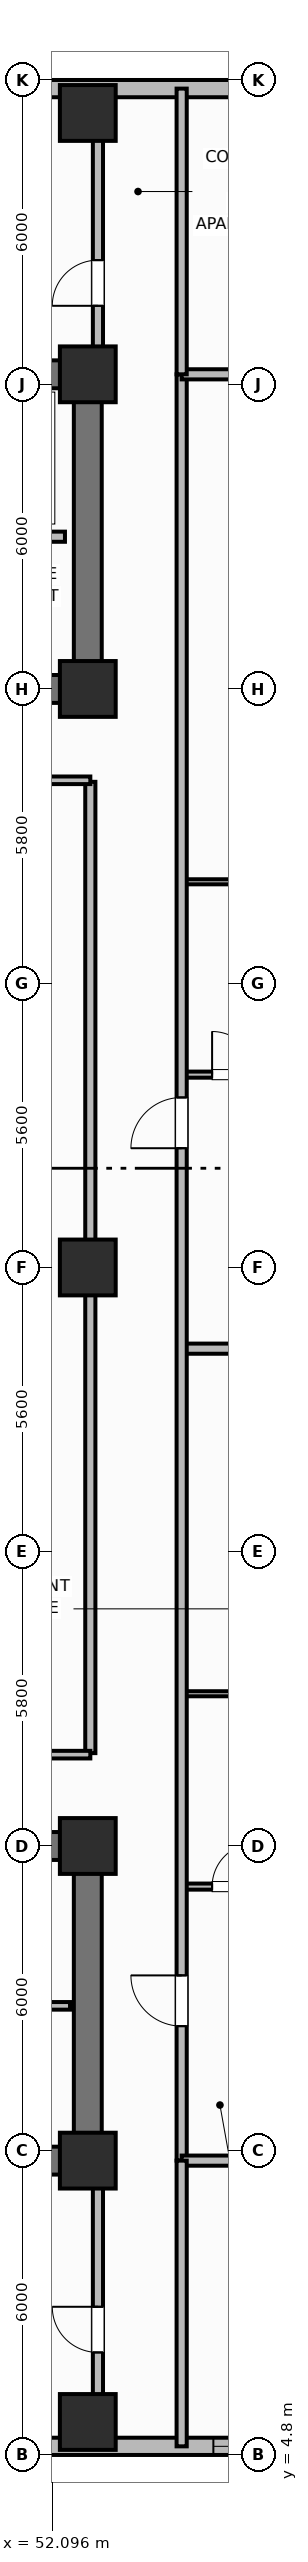
"""IFC4 building model, lengths in metres.
Left out: names, types, materials, properties, quantities, classifications, styles, units other than length and angle.
Written with IfcOpenShell. Run it as: python <this file> out.ifc"""

import sys

from ifc_helpers import new_model, si_unit, direction, frame, frame_2d, origin, origin_2d, place, context, subcontext, project, spatial, rectangle, extrude, element, fill, save


model = new_model("IFC4")
c1 = context("Model", 3, precision=1e-05, world=origin(), true_north=direction((0.0, 1.0)))
c2 = subcontext(c1, "Body", "Model", "MODEL_VIEW")
j1 = project(units=[si_unit("LENGTHUNIT", "METRE"), si_unit("PLANEANGLEUNIT", "RADIAN")], contexts=[c1])
p1 = place(None, origin())
s1 = spatial("IfcSite", under=j1, at=p1, CompositionType="ELEMENT")
p2 = place(p1, origin())
s2 = spatial("IfcBuilding", under=s1, at=p2, CompositionType="ELEMENT")
p3 = place(p2, frame((0.0, 0.0, 95.7)))
s3 = spatial("IfcBuildingStorey", under=s2, at=p3, CompositionType="ELEMENT", Elevation=95.7)
p4 = place(p3, frame((52.8, 10.6, 0.0), z_axis=(0.0, 0.0, 1.0), x_axis=(-1.0, 0.0, 0.0)))
e1 = element("IfcWall", 1, at=p4, inside=s3, PredefinedType="SHEAR", context=c2, shape_type="SweptSolid", body=[
    extrude(rectangle(XDim=27.2, YDim=0.55, at=frame_2d((13.6, 0.0))), origin(), (0.0, 0.0, 1.0), 3.7),
])
p5 = place(p3, frame((52.8, 10.875, 0.0), z_axis=(0.0, 0.0, 1.0), x_axis=(0.0, 1.0, 0.0)))
e2 = element("IfcWall", 2, at=p5, inside=s3, PredefinedType="SHEAR", context=c2, shape_type="SweptSolid", body=[
    extrude(rectangle(XDim=5.65, YDim=0.55, at=frame_2d((2.825, 0.0))), origin(), (0.0, 0.0, 1.0), 3.7),
])
p6 = place(p3, frame((25.6, 16.8, 0.0), z_axis=(0.0, 0.0, 1.0), x_axis=(1.0, 0.0, 0.0)))
e3 = element("IfcWall", 3, at=p6, inside=s3, PredefinedType="SHEAR", context=c2, shape_type="SweptSolid", body=[
    extrude(rectangle(XDim=27.2, YDim=0.55, at=frame_2d((13.6, 0.0))), origin(), (0.0, 0.0, 1.0), 3.7),
])
p7 = place(p6, frame((1.7, 0.0, 0.0)))
e4 = element("IfcOpeningElement", 4, at=p7, cuts=e3, PredefinedType="OPENING", context=c2, shape_type="SweptSolid", body=[
    extrude(rectangle(XDim=1.1, YDim=2.15, at=frame_2d((0.55, 1.075))), frame((0.0, 0.285, 0.0), z_axis=(0.0, -1.0, 0.0), x_axis=(1.0, 0.0, 0.0)), (0.0, 0.0, 1.0), 0.57),
])
p8 = place(p6, frame((4.45, 0.0, 0.0)))
e5 = element("IfcOpeningElement", 5, at=p8, cuts=e3, PredefinedType="OPENING", context=c2, shape_type="SweptSolid", body=[
    extrude(rectangle(XDim=0.85, YDim=2.1, at=frame_2d((0.425, 1.05))), frame((0.0, 0.285, 0.0), z_axis=(0.0, -1.0, 0.0), x_axis=(1.0, 0.0, 0.0)), (0.0, 0.0, 1.0), 0.57),
])
p9 = place(p6, frame((6.5, 0.0, 0.0)))
e6 = element("IfcOpeningElement", 6, at=p9, cuts=e3, PredefinedType="OPENING", context=c2, shape_type="SweptSolid", body=[
    extrude(rectangle(XDim=0.85, YDim=2.1, at=frame_2d((0.425, 1.05))), frame((0.0, 0.285, 0.0), z_axis=(0.0, -1.0, 0.0), x_axis=(1.0, 0.0, 0.0)), (0.0, 0.0, 1.0), 0.57),
])
p10 = place(p6, frame((13.0, 0.0, 0.0)))
e7 = element("IfcOpeningElement", 7, at=p10, cuts=e3, PredefinedType="OPENING", context=c2, shape_type="SweptSolid", body=[
    extrude(rectangle(XDim=1.2, YDim=2.15, at=frame_2d((0.6, 1.075))), frame((0.0, 0.285, 0.0), z_axis=(0.0, -1.0, 0.0), x_axis=(1.0, 0.0, 0.0)), (0.0, 0.0, 1.0), 0.57),
])
p11 = place(p6, frame((19.8, 0.0, 0.0)))
e8 = element("IfcOpeningElement", 8, at=p11, cuts=e3, PredefinedType="OPENING", context=c2, shape_type="SweptSolid", body=[
    extrude(rectangle(XDim=0.85, YDim=2.1, at=frame_2d((0.425, 1.05))), frame((0.0, 0.285, 0.0), z_axis=(0.0, -1.0, 0.0), x_axis=(1.0, 0.0, 0.0)), (0.0, 0.0, 1.0), 0.57),
])
p12 = place(p6, frame((24.2, 0.0, 0.0)))
e9 = element("IfcOpeningElement", 9, at=p12, cuts=e3, PredefinedType="OPENING", context=c2, shape_type="SweptSolid", body=[
    extrude(rectangle(XDim=0.85, YDim=2.1, at=frame_2d((0.425, 1.05))), frame((0.0, 0.285, 0.0), z_axis=(0.0, -1.0, 0.0), x_axis=(1.0, 0.0, 0.0)), (0.0, 0.0, 1.0), 0.57),
])
p13 = place(p3, frame((25.6, 45.8, 0.0), z_axis=(0.0, 0.0, 1.0), x_axis=(1.0, 0.0, 0.0)))
e10 = element("IfcWall", 10, at=p13, inside=s3, PredefinedType="SHEAR", context=c2, shape_type="SweptSolid", body=[
    extrude(rectangle(XDim=27.2, YDim=0.55, at=frame_2d((13.6, 0.0))), origin(), (0.0, 0.0, 1.0), 3.7),
])
p14 = place(p3, frame((52.8, 39.875, 0.0), z_axis=(0.0, 0.0, 1.0), x_axis=(0.0, 1.0, 0.0)))
e11 = element("IfcWall", 11, at=p14, inside=s3, PredefinedType="SHEAR", context=c2, shape_type="SweptSolid", body=[
    extrude(rectangle(XDim=5.65, YDim=0.55, at=frame_2d((2.825, 0.0))), origin(), (0.0, 0.0, 1.0), 3.7),
])
p15 = place(p3, frame((52.8, 39.6, 0.0), z_axis=(0.0, 0.0, 1.0), x_axis=(-1.0, 0.0, 0.0)))
e12 = element("IfcWall", 12, at=p15, inside=s3, PredefinedType="SHEAR", context=c2, shape_type="SweptSolid", body=[
    extrude(rectangle(XDim=27.2, YDim=0.55, at=frame_2d((13.6, 0.0))), origin(), (0.0, 0.0, 1.0), 3.7),
])
p16 = place(p15, frame((24.3, 0.0, 0.0)))
e13 = element("IfcOpeningElement", 13, at=p16, cuts=e12, PredefinedType="OPENING", context=c2, shape_type="SweptSolid", body=[
    extrude(rectangle(XDim=1.1, YDim=2.15, at=frame_2d((0.55, 1.075))), frame((0.0, 0.285, 0.0), z_axis=(0.0, -1.0, 0.0), x_axis=(1.0, 0.0, 0.0)), (0.0, 0.0, 1.0), 0.57),
])
p17 = place(p15, frame((21.85, 0.0, 0.0)))
e14 = element("IfcOpeningElement", 14, at=p17, cuts=e12, PredefinedType="OPENING", context=c2, shape_type="SweptSolid", body=[
    extrude(rectangle(XDim=0.85, YDim=2.1, at=frame_2d((0.425, 1.05))), frame((0.0, 0.285, 0.0), z_axis=(0.0, -1.0, 0.0), x_axis=(1.0, 0.0, 0.0)), (0.0, 0.0, 1.0), 0.57),
])
p18 = place(p15, frame((19.85, 0.0, 0.0)))
e15 = element("IfcOpeningElement", 15, at=p18, cuts=e12, PredefinedType="OPENING", context=c2, shape_type="SweptSolid", body=[
    extrude(rectangle(XDim=0.85, YDim=2.1, at=frame_2d((0.425, 1.05))), frame((0.0, 0.285, 0.0), z_axis=(0.0, -1.0, 0.0), x_axis=(1.0, 0.0, 0.0)), (0.0, 0.0, 1.0), 0.57),
])
p19 = place(p15, frame((15.1, 0.0, 0.0)))
e16 = element("IfcOpeningElement", 16, at=p19, cuts=e12, PredefinedType="OPENING", context=c2, shape_type="SweptSolid", body=[
    extrude(rectangle(XDim=1.2, YDim=2.15, at=frame_2d((0.6, 1.075))), frame((0.0, 0.285, 0.0), z_axis=(0.0, -1.0, 0.0), x_axis=(1.0, 0.0, 0.0)), (0.0, 0.0, 1.0), 0.57),
])
p20 = place(p15, frame((11.3, 0.0, 0.0)))
e17 = element("IfcOpeningElement", 17, at=p20, cuts=e12, PredefinedType="OPENING", context=c2, shape_type="SweptSolid", body=[
    extrude(rectangle(XDim=1.3, YDim=2.2, at=frame_2d((0.65, 1.1))), frame((0.0, 0.285, 0.0), z_axis=(0.0, -1.0, 0.0), x_axis=(1.0, 0.0, 0.0)), (0.0, 0.0, 1.0), 0.57),
])
p21 = place(p15, frame((7.25, 0.0, 0.0)))
e18 = element("IfcOpeningElement", 18, at=p21, cuts=e12, PredefinedType="OPENING", context=c2, shape_type="SweptSolid", body=[
    extrude(rectangle(XDim=0.85, YDim=2.1, at=frame_2d((0.425, 1.05))), frame((0.0, 0.285, 0.0), z_axis=(0.0, -1.0, 0.0), x_axis=(1.0, 0.0, 0.0)), (0.0, 0.0, 1.0), 0.57),
])
p22 = place(p15, frame((4.6, 0.0, 0.0)))
e19 = element("IfcOpeningElement", 19, at=p22, cuts=e12, PredefinedType="OPENING", context=c2, shape_type="SweptSolid", body=[
    extrude(rectangle(XDim=0.85, YDim=2.1, at=frame_2d((0.425, 1.05))), frame((0.0, 0.285, 0.0), z_axis=(0.0, -1.0, 0.0), x_axis=(1.0, 0.0, 0.0)), (0.0, 0.0, 1.0), 0.57),
])
p23 = place(p15, frame((1.9, 0.0, 0.0)))
e20 = element("IfcOpeningElement", 20, at=p23, cuts=e12, PredefinedType="OPENING", context=c2, shape_type="SweptSolid", body=[
    extrude(rectangle(XDim=0.85, YDim=2.1, at=frame_2d((0.425, 1.05))), frame((0.0, 0.285, 0.0), z_axis=(0.0, -1.0, 0.0), x_axis=(1.0, 0.0, 0.0)), (0.0, 0.0, 1.0), 0.57),
])
for number, where, z_axis, x_axis in (
    (21, (52.8, 10.6, 0.0), (0.0, 0.0, 1.0), (1.0, 0.0, 0.0)),
    (22, (52.8, 16.8, 0.0), (0.0, 0.0, 1.0), (1.0, 0.0, 0.0)),
    (23, (52.8, 39.6, 0.0), (0.0, 0.0, 1.0), (1.0, 0.0, 0.0)),
    (24, (52.8, 45.8, 0.0), (0.0, 0.0, 1.0), (1.0, 0.0, 0.0)),
    (25, (52.8, 28.2, 0.0), (0.0, 0.0, 1.0), (1.0, 0.0, 0.0)),
    (26, (52.8, 5.45, 0.0), (0.0, 0.0, 1.0), (1.0, 0.0, 0.0)),
    (27, (52.8, 50.95, 0.0), (0.0, 0.0, 1.0), (1.0, 0.0, 0.0)),
):
    element("IfcColumn", number, at=place(p3, frame(where, z_axis=z_axis, x_axis=x_axis)), inside=s3, PredefinedType="COLUMN", context=c2, shape_type="SweptSolid", body=[
        extrude(rectangle(XDim=1.1, YDim=1.1, at=origin_2d()), origin(), (0.0, 0.0, 1.0), 3.7),
    ])
p24 = place(p3, frame((42.4, 4.97, 0.0), z_axis=(0.0, 0.0, 1.0), x_axis=(1.0, 0.0, 0.0)))
e28 = element("IfcWall", 28, at=p24, inside=s3, PredefinedType="SOLIDWALL", context=c2, shape_type="SweptSolid", body=[
    extrude(rectangle(XDim=17.4, YDim=0.34, at=frame_2d((8.7, 0.0))), origin(), (0.0, 0.0, 1.0), 2.7),
])
p25 = place(p24, frame((4.125, 0.0, 0.93)))
e29 = element("IfcOpeningElement", 29, at=p25, cuts=e28, PredefinedType="OPENING", context=c2, shape_type="SweptSolid", body=[
    extrude(rectangle(XDim=1.1, YDim=1.65, at=frame_2d((0.55, 0.825))), frame((0.0, 0.18, 0.0), z_axis=(0.0, -1.0, 0.0), x_axis=(1.0, 0.0, 0.0)), (0.0, 0.0, 1.0), 0.36),
])
p26 = place(p24, frame((6.808, 0.0, 0.93)))
e30 = element("IfcOpeningElement", 30, at=p26, cuts=e28, PredefinedType="OPENING", context=c2, shape_type="SweptSolid", body=[
    extrude(rectangle(XDim=1.1, YDim=1.65, at=frame_2d((0.55, 0.825))), frame((0.0, 0.18, 0.0), z_axis=(0.0, -1.0, 0.0), x_axis=(1.0, 0.0, 0.0)), (0.0, 0.0, 1.0), 0.36),
])
p27 = place(p24, frame((12.875, 0.0, 0.93)))
e31 = element("IfcOpeningElement", 31, at=p27, cuts=e28, PredefinedType="OPENING", context=c2, shape_type="SweptSolid", body=[
    extrude(rectangle(XDim=1.1, YDim=1.65, at=frame_2d((0.55, 0.825))), frame((0.0, 0.18, 0.0), z_axis=(0.0, -1.0, 0.0), x_axis=(1.0, 0.0, 0.0)), (0.0, 0.0, 1.0), 0.36),
])
p28 = place(p24, frame((14.858, 0.0, 0.93)))
e32 = element("IfcOpeningElement", 32, at=p28, cuts=e28, PredefinedType="OPENING", context=c2, shape_type="SweptSolid", body=[
    extrude(rectangle(XDim=1.1, YDim=1.65, at=frame_2d((0.55, 0.825))), frame((0.0, 0.18, 0.0), z_axis=(0.0, -1.0, 0.0), x_axis=(1.0, 0.0, 0.0)), (0.0, 0.0, 1.0), 0.36),
])
p29 = place(p3, frame((59.8, 51.43, 0.0), z_axis=(0.0, 0.0, 1.0), x_axis=(-1.0, 0.0, 0.0)))
e33 = element("IfcWall", 33, at=p29, inside=s3, PredefinedType="SOLIDWALL", context=c2, shape_type="SweptSolid", body=[
    extrude(rectangle(XDim=17.4, YDim=0.34, at=frame_2d((8.7, 0.0))), origin(), (0.0, 0.0, 1.0), 2.7),
])
p30 = place(p29, frame((1.46, 0.0, 0.68)))
e34 = element("IfcOpeningElement", 34, at=p30, cuts=e33, PredefinedType="OPENING", context=c2, shape_type="SweptSolid", body=[
    extrude(rectangle(XDim=1.6, YDim=1.9, at=frame_2d((0.8, 0.95))), frame((0.0, 0.18, 0.0), z_axis=(0.0, -1.0, 0.0), x_axis=(1.0, 0.0, 0.0)), (0.0, 0.0, 1.0), 0.36),
])
p31 = place(p29, frame((8.25, 0.0, 0.68)))
e35 = element("IfcOpeningElement", 35, at=p31, cuts=e33, PredefinedType="OPENING", context=c2, shape_type="SweptSolid", body=[
    extrude(rectangle(XDim=1.6, YDim=1.9, at=frame_2d((0.8, 0.95))), frame((0.0, 0.18, 0.0), z_axis=(0.0, -1.0, 0.0), x_axis=(1.0, 0.0, 0.0)), (0.0, 0.0, 1.0), 0.36),
])
p32 = place(p29, frame((11.12, 0.0, 0.68)))
e36 = element("IfcOpeningElement", 36, at=p32, cuts=e33, PredefinedType="OPENING", context=c2, shape_type="SweptSolid", body=[
    extrude(rectangle(XDim=1.6, YDim=1.9, at=frame_2d((0.8, 0.95))), frame((0.0, 0.18, 0.0), z_axis=(0.0, -1.0, 0.0), x_axis=(1.0, 0.0, 0.0)), (0.0, 0.0, 1.0), 0.36),
])
p33 = place(p3, frame((48.05, 13.65, 0.0), z_axis=(0.0, 0.0, 1.0), x_axis=(1.0, 0.0, 0.0)))
e37 = element("IfcWall", 37, at=p33, inside=s3, PredefinedType="PARTITIONING", context=c2, shape_type="SweptSolid", body=[
    extrude(rectangle(XDim=4.4, YDim=0.15, at=frame_2d((2.2, 0.0))), origin(), (0.0, 0.0, 1.0), 2.53),
])
p34 = place(p33, frame((1.6, 0.0, 0.0)))
e38 = element("IfcOpeningElement", 38, at=p34, cuts=e37, PredefinedType="OPENING", context=c2, shape_type="SweptSolid", body=[
    extrude(rectangle(XDim=0.85, YDim=2.1, at=frame_2d((0.425, 1.05))), frame((0.0, 0.085, 0.0), z_axis=(0.0, -1.0, 0.0), x_axis=(1.0, 0.0, 0.0)), (0.0, 0.0, 1.0), 0.17),
])
p35 = place(p3, frame((52.35, 42.6, 0.0), z_axis=(0.0, 0.0, 1.0), x_axis=(-1.0, 0.0, 0.0)))
e39 = element("IfcWall", 39, at=p35, inside=s3, PredefinedType="PARTITIONING", context=c2, shape_type="SweptSolid", body=[
    extrude(rectangle(XDim=8.8, YDim=0.2, at=frame_2d((4.4, 0.0))), origin(), (0.0, 0.0, 1.0), 2.53),
])
p36 = place(p35, frame((7.1, 0.0, 0.0)))
e40 = element("IfcOpeningElement", 40, at=p36, cuts=e39, PredefinedType="OPENING", context=c2, shape_type="SweptSolid", body=[
    extrude(rectangle(XDim=1.0, YDim=2.15, at=frame_2d((0.5, 1.075))), frame((0.0, 0.11, 0.0), z_axis=(0.0, -1.0, 0.0), x_axis=(1.0, 0.0, 0.0)), (0.0, 0.0, 1.0), 0.22),
])
p37 = place(p3, frame((52.85, 18.63, 0.0), z_axis=(0.0, 0.0, 1.0), x_axis=(0.0, 1.0, 0.0)))
e41 = element("IfcWall", 41, at=p37, inside=s3, PredefinedType="PARTITIONING", context=c2, shape_type="SweptSolid", body=[
    extrude(rectangle(XDim=19.14, YDim=0.2, at=frame_2d((9.57, 0.0))), origin(), (0.0, 0.0, 1.0), 2.53),
])
for number, where, z_axis, x_axis in (
    (42, (46.35, 18.6, 0.0), (0.0, 0.0, 1.0), (1.0, 0.0, 0.0)),
    (43, (46.35, 37.8, 0.0), (0.0, 0.0, 1.0), (1.0, 0.0, 0.0)),
):
    element("IfcWall", number, at=place(p3, frame(where, z_axis=z_axis, x_axis=x_axis)), inside=s3, PredefinedType="PARTITIONING", context=c2, shape_type="SweptSolid", body=[
        extrude(rectangle(XDim=6.5, YDim=0.15, at=frame_2d((3.25, 0.0))), origin(), (0.0, 0.0, 1.0), 2.53),
    ])
p38 = place(p3, frame((54.65, 16.0, 0.0), z_axis=(0.0, 0.0, 1.0), x_axis=(1.0, 0.0, 0.0)))
e44 = element("IfcWall", 44, at=p38, inside=s3, PredefinedType="PARTITIONING", context=c2, shape_type="SweptSolid", body=[
    extrude(rectangle(XDim=2.25, YDim=0.12, at=frame_2d((1.125, 0.0))), origin(), (0.0, 0.0, 1.0), 2.53),
])
p39 = place(p38, frame((0.6, 0.0, 0.0)))
e45 = element("IfcOpeningElement", 45, at=p39, cuts=e44, PredefinedType="OPENING", context=c2, shape_type="SweptSolid", body=[
    extrude(rectangle(XDim=0.85, YDim=2.1, at=frame_2d((0.425, 1.05))), frame((0.0, 0.07, 0.0), z_axis=(0.0, -1.0, 0.0), x_axis=(1.0, 0.0, 0.0)), (0.0, 0.0, 1.0), 0.14),
])
p40 = place(p3, frame((54.65, 19.8, 0.0), z_axis=(0.0, 0.0, 1.0), x_axis=(1.0, 0.0, 0.0)))
e46 = element("IfcWall", 46, at=p40, inside=s3, PredefinedType="PARTITIONING", context=c2, shape_type="SweptSolid", body=[
    extrude(rectangle(XDim=2.25, YDim=0.1, at=frame_2d((1.125, 0.0))), origin(), (0.0, 0.0, 1.0), 2.53),
])
p41 = place(p3, frame((54.65, 26.6, 0.0), z_axis=(0.0, 0.0, 1.0), x_axis=(1.0, 0.0, 0.0)))
e47 = element("IfcWall", 47, at=p41, inside=s3, PredefinedType="PARTITIONING", context=c2, shape_type="SweptSolid", body=[
    extrude(rectangle(XDim=8.637, YDim=0.2, at=frame_2d((4.319, 0.0))), origin(), (0.0, 0.0, 1.0), 2.53),
])
p42 = place(p3, frame((54.65, 32.0, 0.0), z_axis=(0.0, 0.0, 1.0), x_axis=(1.0, 0.0, 0.0)))
e48 = element("IfcWall", 48, at=p42, inside=s3, PredefinedType="PARTITIONING", context=c2, shape_type="SweptSolid", body=[
    extrude(rectangle(XDim=2.25, YDim=0.12, at=frame_2d((1.125, 0.0))), origin(), (0.0, 0.0, 1.0), 2.53),
])
p43 = place(p42, frame((0.6, 0.0, 0.0)))
e49 = element("IfcOpeningElement", 49, at=p43, cuts=e48, PredefinedType="OPENING", context=c2, shape_type="SweptSolid", body=[
    extrude(rectangle(XDim=0.85, YDim=2.1, at=frame_2d((0.425, 1.05))), frame((0.0, 0.07, 0.0), z_axis=(0.0, -1.0, 0.0), x_axis=(1.0, 0.0, 0.0)), (0.0, 0.0, 1.0), 0.14),
])
p44 = place(p3, frame((54.65, 35.8, 0.0), z_axis=(0.0, 0.0, 1.0), x_axis=(1.0, 0.0, 0.0)))
e50 = element("IfcWall", 50, at=p44, inside=s3, PredefinedType="PARTITIONING", context=c2, shape_type="SweptSolid", body=[
    extrude(rectangle(XDim=2.25, YDim=0.1, at=frame_2d((1.125, 0.0))), origin(), (0.0, 0.0, 1.0), 2.53),
])
p45 = place(p3, frame((54.65, 10.6, 0.0), z_axis=(0.0, 0.0, 1.0), x_axis=(0.0, 1.0, 0.0)))
e51 = element("IfcWall", 51, at=p45, inside=s3, PredefinedType="PARTITIONING", context=c2, shape_type="SweptSolid", body=[
    extrude(rectangle(XDim=35.2, YDim=0.2, at=frame_2d((17.6, 0.0))), origin(), (0.0, 0.0, 1.0), 2.53),
])
p46 = place(p45, frame((2.65, 0.0, 0.0)))
e52 = element("IfcOpeningElement", 52, at=p46, cuts=e51, PredefinedType="OPENING", context=c2, shape_type="SweptSolid", body=[
    extrude(rectangle(XDim=1.0, YDim=2.15, at=frame_2d((0.5, 1.075))), frame((0.0, 0.11, 0.0), z_axis=(0.0, -1.0, 0.0), x_axis=(1.0, 0.0, 0.0)), (0.0, 0.0, 1.0), 0.22),
])
p47 = place(p45, frame((19.95, 0.0, 0.0)))
e53 = element("IfcOpeningElement", 53, at=p47, cuts=e51, PredefinedType="OPENING", context=c2, shape_type="SweptSolid", body=[
    extrude(rectangle(XDim=1.0, YDim=2.15, at=frame_2d((0.5, 1.075))), frame((0.0, 0.11, 0.0), z_axis=(0.0, -1.0, 0.0), x_axis=(1.0, 0.0, 0.0)), (0.0, 0.0, 1.0), 0.22),
])
for number, where, z_axis, x_axis in (
    (54, (54.65, 10.6, 0.0), (0.0, 0.0, 1.0), (1.0, 0.0, 0.0)),
    (55, (54.65, 45.8, 0.0), (0.0, 0.0, 1.0), (1.0, 0.0, 0.0)),
):
    element("IfcWall", number, at=place(p3, frame(where, z_axis=z_axis, x_axis=x_axis)), inside=s3, PredefinedType="PARTITIONING", context=c2, shape_type="SweptSolid", body=[
        extrude(rectangle(XDim=8.76, YDim=0.2, at=frame_2d((4.38, 0.0))), origin(), (0.0, 0.0, 1.0), 2.53),
    ])
p48 = place(p3, frame((54.65, 4.97, 0.0), z_axis=(0.0, 0.0, 1.0), x_axis=(0.0, 1.0, 0.0)))
e56 = element("IfcWall", 56, at=p48, inside=s3, PredefinedType="PARTITIONING", context=c2, shape_type="SweptSolid", body=[
    extrude(rectangle(XDim=5.63, YDim=0.2, at=frame_2d((2.815, 0.0))), origin(), (0.0, 0.0, 1.0), 2.53),
])
p49 = place(p3, frame((54.65, 45.8, 0.0), z_axis=(0.0, 0.0, 1.0), x_axis=(0.0, 1.0, 0.0)))
e57 = element("IfcWall", 57, at=p49, inside=s3, PredefinedType="PARTITIONING", context=c2, shape_type="SweptSolid", body=[
    extrude(rectangle(XDim=5.63, YDim=0.2, at=frame_2d((2.815, 0.0))), origin(), (0.0, 0.0, 1.0), 2.53),
])
p50 = place(p3, frame((53.0, 5.97, 0.0), z_axis=(0.0, 0.0, 1.0), x_axis=(0.0, 1.0, 0.0)))
e58 = element("IfcWall", 58, at=p50, inside=s3, PredefinedType="PARTITIONING", context=c2, shape_type="SweptSolid", body=[
    extrude(rectangle(XDim=4.33, YDim=0.2, at=frame_2d((2.165, 0.0))), origin(), (0.0, 0.0, 1.0), 2.53),
])
p51 = place(p50, frame((0.85, 0.0, 0.0)))
e59 = element("IfcOpeningElement", 59, at=p51, cuts=e58, PredefinedType="OPENING", context=c2, shape_type="SweptSolid", body=[
    extrude(rectangle(XDim=0.9, YDim=2.1, at=frame_2d((0.45, 1.05))), frame((0.0, 0.11, 0.0), z_axis=(0.0, -1.0, 0.0), x_axis=(1.0, 0.0, 0.0)), (0.0, 0.0, 1.0), 0.22),
])
p52 = place(p3, frame((53.0, 46.1, 0.0), z_axis=(0.0, 0.0, 1.0), x_axis=(0.0, 1.0, 0.0)))
e60 = element("IfcWall", 60, at=p52, inside=s3, PredefinedType="PARTITIONING", context=c2, shape_type="SweptSolid", body=[
    extrude(rectangle(XDim=4.33, YDim=0.2, at=frame_2d((2.165, 0.0))), origin(), (0.0, 0.0, 1.0), 2.53),
])
p53 = place(p52, frame((1.05, 0.0, 0.0)))
e61 = element("IfcOpeningElement", 61, at=p53, cuts=e60, PredefinedType="OPENING", context=c2, shape_type="SweptSolid", body=[
    extrude(rectangle(XDim=0.9, YDim=2.1, at=frame_2d((0.45, 1.05))), frame((0.0, 0.11, 0.0), z_axis=(0.0, -1.0, 0.0), x_axis=(1.0, 0.0, 0.0)), (0.0, 0.0, 1.0), 0.22),
])
p54 = place(p27, origin())
e62 = element("IfcWindow", 62, at=p54, inside=s3, PartitioningType="SINGLE_PANEL", PredefinedType="WINDOW", context=c2, shape_type="SweptSolid", body=[
    extrude(rectangle(XDim=1.1, YDim=1.65, at=frame_2d((0.55, 0.825))), frame((0.0, 0.03, 0.0), z_axis=(0.0, -1.0, 0.0), x_axis=(1.0, 0.0, 0.0)), (0.0, 0.0, 1.0), 0.06),
])
fill(e31, e62)
p55 = place(p39, origin())
e63 = element("IfcDoor", 63, at=p55, inside=s3, OperationType="SINGLE_SWING_RIGHT", PredefinedType="DOOR", context=c2, shape_type="SweptSolid", body=[
    extrude(rectangle(XDim=0.85, YDim=2.1, at=frame_2d((0.425, 1.05))), frame((0.0, 0.025, 0.0), z_axis=(0.0, -1.0, 0.0), x_axis=(1.0, 0.0, 0.0)), (0.0, 0.0, 1.0), 0.05),
])
fill(e45, e63)
p56 = place(p43, origin())
e64 = element("IfcDoor", 64, at=p56, inside=s3, OperationType="SINGLE_SWING_LEFT", PredefinedType="DOOR", context=c2, shape_type="SweptSolid", body=[
    extrude(rectangle(XDim=0.85, YDim=2.1, at=frame_2d((0.425, 1.05))), frame((0.0, 0.025, 0.0), z_axis=(0.0, -1.0, 0.0), x_axis=(1.0, 0.0, 0.0)), (0.0, 0.0, 1.0), 0.05),
])
fill(e49, e64)
p57 = place(p46, origin())
e65 = element("IfcDoor", 65, at=p57, inside=s3, OperationType="SINGLE_SWING_RIGHT", PredefinedType="DOOR", context=c2, shape_type="SweptSolid", body=[
    extrude(rectangle(XDim=1.0, YDim=2.15, at=frame_2d((0.5, 1.075))), frame((0.0, 0.025, 0.0), z_axis=(0.0, -1.0, 0.0), x_axis=(1.0, 0.0, 0.0)), (0.0, 0.0, 1.0), 0.05),
])
fill(e52, e65)
p58 = place(p47, origin())
e66 = element("IfcDoor", 66, at=p58, inside=s3, OperationType="SINGLE_SWING_LEFT", PredefinedType="DOOR", context=c2, shape_type="SweptSolid", body=[
    extrude(rectangle(XDim=1.0, YDim=2.15, at=frame_2d((0.5, 1.075))), frame((0.0, 0.025, 0.0), z_axis=(0.0, -1.0, 0.0), x_axis=(1.0, 0.0, 0.0)), (0.0, 0.0, 1.0), 0.05),
])
fill(e53, e66)
p59 = place(p51, origin())
e67 = element("IfcDoor", 67, at=p59, inside=s3, OperationType="SINGLE_SWING_RIGHT", PredefinedType="DOOR", context=c2, shape_type="SweptSolid", body=[
    extrude(rectangle(XDim=0.9, YDim=2.1, at=frame_2d((0.45, 1.05))), frame((0.0, 0.025, 0.0), z_axis=(0.0, -1.0, 0.0), x_axis=(1.0, 0.0, 0.0)), (0.0, 0.0, 1.0), 0.05),
])
fill(e59, e67)
p60 = place(p53, origin())
e68 = element("IfcDoor", 68, at=p60, inside=s3, OperationType="SINGLE_SWING_LEFT", PredefinedType="DOOR", context=c2, shape_type="SweptSolid", body=[
    extrude(rectangle(XDim=0.9, YDim=2.1, at=frame_2d((0.45, 1.05))), frame((0.0, 0.025, 0.0), z_axis=(0.0, -1.0, 0.0), x_axis=(1.0, 0.0, 0.0)), (0.0, 0.0, 1.0), 0.05),
])
fill(e61, e68)
save(model, sys.argv[1])
